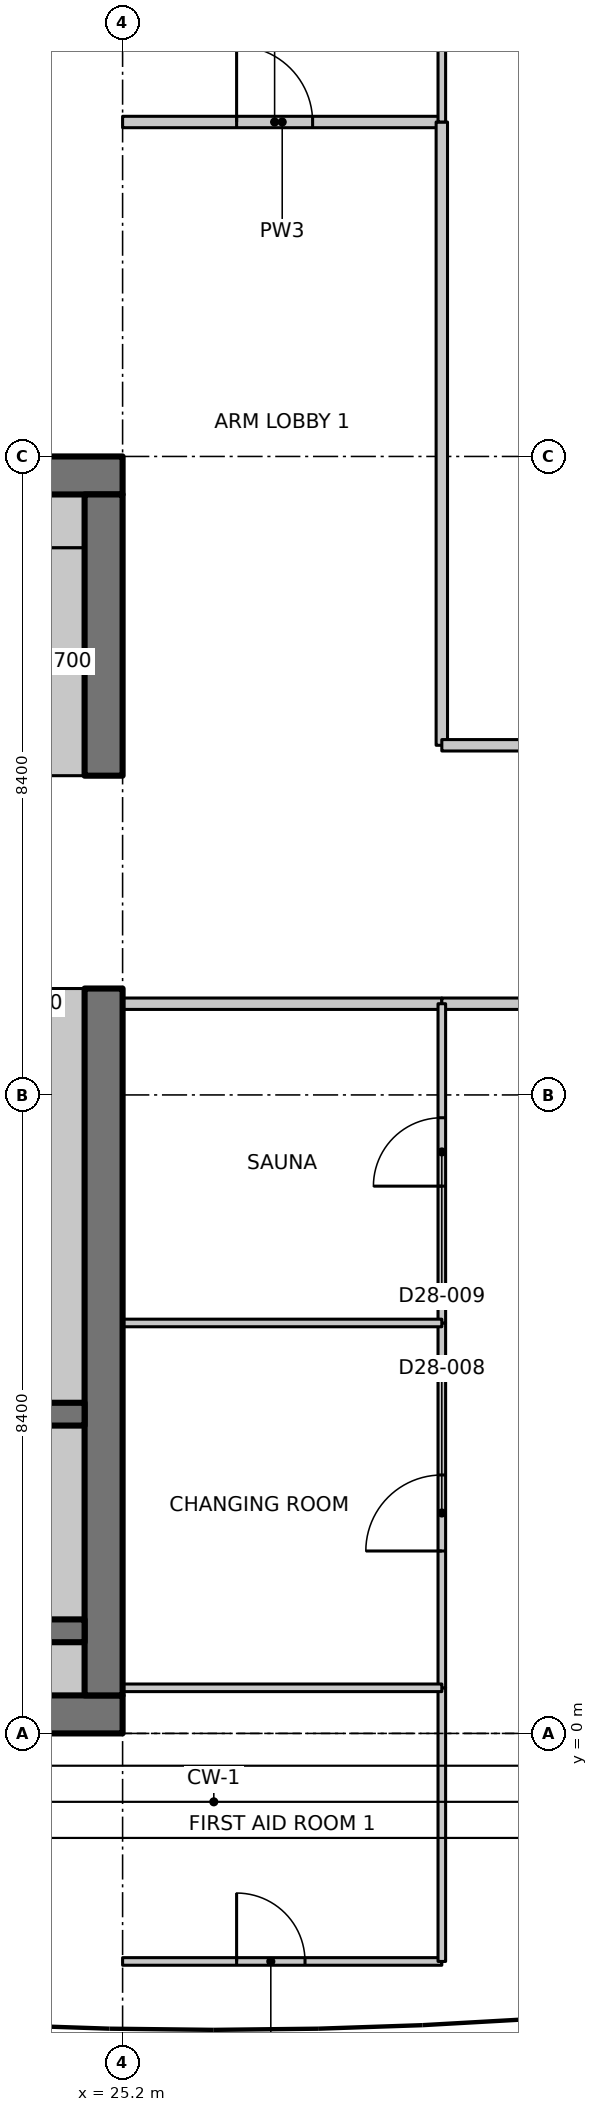
"""IFC4 building model, lengths in metres.
Left out: names, types, materials, properties, quantities, classifications, styles, units other than length and angle.
Written with IfcOpenShell. Run it as: python <this file> out.ifc"""

import sys

from ifc_helpers import new_model, si_unit, direction, frame, frame_2d, origin, place, context, subcontext, project, spatial, polyline, rectangle, outline, extrude, element, fill, save


model = new_model("IFC4")
c1 = context("Model", 3, precision=1e-05, world=origin(), true_north=direction((0.0, 1.0)))
c2 = subcontext(c1, "Body", "Model", "MODEL_VIEW")
j1 = project(units=[si_unit("LENGTHUNIT", "METRE"), si_unit("PLANEANGLEUNIT", "RADIAN")], contexts=[c1])
p1 = place(None, origin())
s1 = spatial("IfcSite", under=j1, at=p1, CompositionType="ELEMENT")
p2 = place(p1, origin())
s2 = spatial("IfcBuilding", under=s1, at=p2, CompositionType="ELEMENT")
p3 = place(p2, frame((0.0, 0.0, 226.5)))
s3 = spatial("IfcBuildingStorey", under=s2, at=p3, CompositionType="ELEMENT", Elevation=226.5)
p4 = place(p3, frame((7.436, 0.25, 0.0), z_axis=(0.0, 0.0, 1.0), x_axis=(1.0, 0.0, 0.0)))
e1 = element("IfcWall", 1, at=p4, inside=s3, PredefinedType="SHEAR", context=c2, shape_type="SweptSolid", body=[
    extrude(rectangle(XDim=17.764, YDim=0.5, at=frame_2d((8.882, 0.0))), origin(), (0.0, 0.0, 1.0), 3.35),
])
p5 = place(p3, frame((23.8, 16.55, 0.0), z_axis=(0.0, 0.0, 1.0), x_axis=(1.0, 0.0, 0.0)))
e2 = element("IfcWall", 2, at=p5, inside=s3, PredefinedType="SHEAR", context=c2, shape_type="SweptSolid", body=[
    extrude(rectangle(XDim=1.4, YDim=0.5, at=frame_2d((0.7, 0.0))), origin(), (0.0, 0.0, 1.0), 3.35),
])
p6 = place(p3, frame((24.95, 0.5, 0.0), z_axis=(0.0, 0.0, 1.0), x_axis=(0.0, 1.0, 0.0)))
e3 = element("IfcWall", 3, at=p6, inside=s3, PredefinedType="SHEAR", context=c2, shape_type="SweptSolid", body=[
    extrude(rectangle(XDim=9.3, YDim=0.5, at=frame_2d((4.65, 0.0))), origin(), (0.0, 0.0, 1.0), 3.35),
])
p7 = place(p3, frame((24.95, 12.6, 0.0), z_axis=(0.0, 0.0, 1.0), x_axis=(0.0, 1.0, 0.0)))
e4 = element("IfcWall", 4, at=p7, inside=s3, PredefinedType="SHEAR", context=c2, shape_type="SweptSolid", body=[
    extrude(rectangle(XDim=3.7, YDim=0.5, at=frame_2d((1.85, 0.0))), origin(), (0.0, 0.0, 1.0), 3.35),
])
p8 = place(p3, frame((24.35, 12.6, 0.0), z_axis=(0.0, 0.0, 1.0), x_axis=(0.0, 1.0, 0.0)))
e5 = element("IfcWall", 5, at=p8, inside=s3, PredefinedType="PARTITIONING", context=c2, shape_type="SweptSolid", body=[
    extrude(rectangle(XDim=3.0, YDim=0.7, at=frame_2d((1.5, 0.0))), origin(), (0.0, 0.0, 1.0), 3.35),
])
p9 = place(p3, frame((23.8, 15.95, 0.0), z_axis=(0.0, 0.0, 1.0), x_axis=(1.0, 0.0, 0.0)))
e6 = element("IfcWall", 6, at=p9, inside=s3, PredefinedType="PARTITIONING", context=c2, shape_type="SweptSolid", body=[
    extrude(rectangle(XDim=0.9, YDim=0.7, at=frame_2d((0.45, 0.0))), origin(), (0.0, 0.0, 1.0), 3.35),
])
p10 = place(p3, frame((15.8, 1.35, 0.0), z_axis=(0.0, 0.0, 1.0), x_axis=(1.0, 0.0, 0.0)))
e7 = element("IfcWall", 7, at=p10, inside=s3, PredefinedType="SHEAR", context=c2, shape_type="SweptSolid", body=[
    extrude(rectangle(XDim=8.9, YDim=0.3, at=frame_2d((4.45, 0.0))), origin(), (0.0, 0.0, 1.0), 3.35),
])
p11 = place(p3, frame((15.8, 4.2, 0.0), z_axis=(0.0, 0.0, 1.0), x_axis=(1.0, 0.0, 0.0)))
e8 = element("IfcWall", 8, at=p11, inside=s3, PredefinedType="SHEAR", context=c2, shape_type="SweptSolid", body=[
    extrude(rectangle(XDim=8.9, YDim=0.3, at=frame_2d((4.45, 0.0))), origin(), (0.0, 0.0, 1.0), 3.35),
])
p12 = place(p11, frame((0.4, 0.0, 0.0)))
e9 = element("IfcOpeningElement", 9, at=p12, cuts=e8, PredefinedType="OPENING", context=c2, shape_type="SweptSolid", body=[
    extrude(rectangle(XDim=1.0, YDim=2.1, at=frame_2d((0.5, 1.05))), frame((0.0, 0.16, 0.0), z_axis=(0.0, -1.0, 0.0), x_axis=(1.0, 0.0, 0.0)), (0.0, 0.0, 1.0), 0.32),
])
p13 = place(p3, frame((13.35, 0.85, 0.0), z_axis=(0.0, 0.0, 1.0), x_axis=(1.0, 0.0, 0.0)))
e10 = element("IfcWall", 10, at=p13, inside=s3, PredefinedType="PARTITIONING", context=c2, shape_type="SweptSolid", body=[
    extrude(rectangle(XDim=11.35, YDim=0.7, at=frame_2d((5.675, 0.0))), origin(), (0.0, 0.0, 1.0), 3.35),
])
p14 = place(p3, frame((24.35, 1.5, 0.0), z_axis=(0.0, 0.0, 1.0), x_axis=(0.0, 1.0, 0.0)))
e11 = element("IfcWall", 11, at=p14, inside=s3, PredefinedType="PARTITIONING", context=c2, shape_type="SweptSolid", body=[
    extrude(rectangle(XDim=2.55, YDim=0.7, at=frame_2d((1.275, 0.0))), origin(), (0.0, 0.0, 1.0), 3.35),
])
p15 = place(p3, frame((24.35, 4.35, 0.0), z_axis=(0.0, 0.0, 1.0), x_axis=(0.0, 1.0, 0.0)))
e12 = element("IfcWall", 12, at=p15, inside=s3, PredefinedType="PARTITIONING", context=c2, shape_type="SweptSolid", body=[
    extrude(rectangle(XDim=5.45, YDim=0.7, at=frame_2d((2.725, 0.0))), origin(), (0.0, 0.0, 1.0), 3.35),
])
p16 = place(p3, frame((25.2, 21.2, 0.0), z_axis=(0.0, 0.0, 1.0), x_axis=(1.0, 0.0, 0.0)))
e13 = element("IfcWall", 13, at=p16, inside=s3, PredefinedType="PARTITIONING", context=c2, shape_type="SweptSolid", body=[
    extrude(rectangle(XDim=4.2, YDim=0.15, at=frame_2d((2.1, 0.0))), origin(), (0.0, 0.0, 1.0), 3.33),
])
p17 = place(p16, frame((1.5, 0.0, 0.0)))
e14 = element("IfcOpeningElement", 14, at=p17, cuts=e13, PredefinedType="OPENING", context=c2, shape_type="SweptSolid", body=[
    extrude(rectangle(XDim=1.0, YDim=2.1, at=frame_2d((0.5, 1.05))), frame((0.0, 0.085, 0.0), z_axis=(0.0, -1.0, 0.0), x_axis=(1.0, 0.0, 0.0)), (0.0, 0.0, 1.0), 0.17),
])
p18 = place(p3, frame((29.4, 9.6, 0.0), z_axis=(0.0, 0.0, 1.0), x_axis=(-1.0, 0.0, 0.0)))
e15 = element("IfcWall", 15, at=p18, inside=s3, PredefinedType="PARTITIONING", context=c2, shape_type="SweptSolid", body=[
    extrude(rectangle(XDim=4.2, YDim=0.15, at=frame_2d((2.1, 0.0))), origin(), (0.0, 0.0, 1.0), 3.33),
])
p19 = place(p3, frame((29.4, 21.2, 0.0), z_axis=(0.0, 0.0, 1.0), x_axis=(0.0, -1.0, 0.0)))
e16 = element("IfcWall", 16, at=p19, inside=s3, PredefinedType="PARTITIONING", context=c2, shape_type="SweptSolid", body=[
    extrude(rectangle(XDim=8.2, YDim=0.15, at=frame_2d((4.1, 0.0))), origin(), (0.0, 0.0, 1.0), 3.33),
])
p20 = place(p3, frame((29.4, 27.511, 0.0), z_axis=(0.0, 0.0, 1.0), x_axis=(0.0, -1.0, 0.0)))
e17 = element("IfcWall", 17, at=p20, inside=s3, PredefinedType="PARTITIONING", context=c2, shape_type="SweptSolid", body=[
    extrude(outline(polyline([(0.0, 0.0), (6.311, 0.0), (6.311, 3.33), (2.761, 3.33), (2.759, 2.98), (1.863, 2.98), (1.861, 3.33), (0.236, 3.33), (0.0, 3.33), (0.0, 0.0)])), frame((0.0, 0.05, 0.0), z_axis=(0.0, -1.0, 0.0), x_axis=(1.0, 0.0, 0.0)), (0.0, 0.0, 1.0), 0.1),
])
p21 = place(p3, frame((37.8, 9.6, 0.0), z_axis=(0.0, 0.0, 1.0), x_axis=(-1.0, 0.0, 0.0)))
e18 = element("IfcWall", 18, at=p21, inside=s3, PredefinedType="PARTITIONING", context=c2, shape_type="SweptSolid", body=[
    extrude(rectangle(XDim=8.4, YDim=0.15, at=frame_2d((4.2, 0.0))), origin(), (0.0, 0.0, 1.0), 3.33),
])
p22 = place(p21, frame((4.8, 0.0, 0.0)))
e19 = element("IfcOpeningElement", 19, at=p22, cuts=e18, PredefinedType="OPENING", context=c2, shape_type="SweptSolid", body=[
    extrude(rectangle(XDim=2.0, YDim=2.4, at=frame_2d((1.0, 1.2))), frame((0.0, 0.085, 0.0), z_axis=(0.0, -1.0, 0.0), x_axis=(1.0, 0.0, 0.0)), (0.0, 0.0, 1.0), 0.17),
])
p23 = place(p3, frame((29.4, 13.0, 0.0), z_axis=(0.0, 0.0, 1.0), x_axis=(1.0, 0.0, 0.0)))
e20 = element("IfcWall", 20, at=p23, inside=s3, PredefinedType="PARTITIONING", context=c2, shape_type="SweptSolid", body=[
    extrude(rectangle(XDim=8.4, YDim=0.15, at=frame_2d((4.2, 0.0))), origin(), (0.0, 0.0, 1.0), 3.33),
])
p24 = place(p23, frame((3.3, 0.0, 0.0)))
e21 = element("IfcOpeningElement", 21, at=p24, cuts=e20, PredefinedType="OPENING", context=c2, shape_type="SweptSolid", body=[
    extrude(rectangle(XDim=1.8, YDim=2.1, at=frame_2d((0.9, 1.05))), frame((0.0, 0.085, 0.0), z_axis=(0.0, -1.0, 0.0), x_axis=(1.0, 0.0, 0.0)), (0.0, 0.0, 1.0), 0.17),
])
p25 = place(p3, frame((25.2, -3.0, 0.0), z_axis=(0.0, 0.0, 1.0), x_axis=(1.0, 0.0, 0.0)))
e22 = element("IfcWall", 22, at=p25, inside=s3, PredefinedType="PARTITIONING", context=c2, shape_type="SweptSolid", body=[
    extrude(rectangle(XDim=4.2, YDim=0.1, at=frame_2d((2.1, 0.0))), origin(), (0.0, 0.0, 1.0), 3.33),
])
p26 = place(p25, frame((1.5, 0.0, 0.0)))
e23 = element("IfcOpeningElement", 23, at=p26, cuts=e22, PredefinedType="OPENING", context=c2, shape_type="SweptSolid", body=[
    extrude(rectangle(XDim=0.9, YDim=2.1, at=frame_2d((0.45, 1.05))), frame((0.0, 0.06, 0.0), z_axis=(0.0, -1.0, 0.0), x_axis=(1.0, 0.0, 0.0)), (0.0, 0.0, 1.0), 0.12),
])
p27 = place(p3, frame((29.4, -3.0, 0.0), z_axis=(0.0, 0.0, 1.0), x_axis=(0.0, 1.0, 0.0)))
e24 = element("IfcWall", 24, at=p27, inside=s3, PredefinedType="PARTITIONING", context=c2, shape_type="SweptSolid", body=[
    extrude(rectangle(XDim=3.6, YDim=0.1, at=frame_2d((1.8, 0.0))), origin(), (0.0, 0.0, 1.0), 2.98),
])
p28 = place(p3, frame((29.4, 0.6, 0.0), z_axis=(0.0, 0.0, 1.0), x_axis=(0.0, 1.0, 0.0)))
e25 = element("IfcWall", 25, at=p28, inside=s3, PredefinedType="PARTITIONING", context=c2, shape_type="SweptSolid", body=[
    extrude(rectangle(XDim=4.8, YDim=0.1, at=frame_2d((2.4, 0.0))), origin(), (0.0, 0.0, 1.0), 3.33),
])
p29 = place(p28, frame((1.8, 0.0, 0.0)))
e26 = element("IfcOpeningElement", 26, at=p29, cuts=e25, PredefinedType="OPENING", context=c2, shape_type="SweptSolid", body=[
    extrude(rectangle(XDim=1.0, YDim=2.1, at=frame_2d((0.5, 1.05))), frame((0.0, 0.06, 0.0), z_axis=(0.0, -1.0, 0.0), x_axis=(1.0, 0.0, 0.0)), (0.0, 0.0, 1.0), 0.12),
])
p30 = place(p3, frame((29.4, 5.4, 0.0), z_axis=(0.0, 0.0, 1.0), x_axis=(0.0, 1.0, 0.0)))
e27 = element("IfcWall", 27, at=p30, inside=s3, PredefinedType="PARTITIONING", context=c2, shape_type="SweptSolid", body=[
    extrude(rectangle(XDim=4.2, YDim=0.1, at=frame_2d((2.1, 0.0))), origin(), (0.0, 0.0, 1.0), 3.33),
])
p31 = place(p30, frame((1.8, 0.0, 0.0)))
e28 = element("IfcOpeningElement", 28, at=p31, cuts=e27, PredefinedType="OPENING", context=c2, shape_type="SweptSolid", body=[
    extrude(rectangle(XDim=0.9, YDim=2.1, at=frame_2d((0.45, 1.05))), frame((0.0, 0.06, 0.0), z_axis=(0.0, -1.0, 0.0), x_axis=(1.0, 0.0, 0.0)), (0.0, 0.0, 1.0), 0.12),
])
for number, where, z_axis, x_axis in (
    (29, (25.2, 0.6, 0.0), (0.0, 0.0, 1.0), (1.0, 0.0, 0.0)),
    (30, (25.2, 5.4, 0.0), (0.0, 0.0, 1.0), (1.0, 0.0, 0.0)),
):
    element("IfcWall", number, at=place(p3, frame(where, z_axis=z_axis, x_axis=x_axis)), inside=s3, PredefinedType="PARTITIONING", context=c2, shape_type="SweptSolid", body=[
        extrude(rectangle(XDim=4.2, YDim=0.1, at=frame_2d((2.1, 0.0))), origin(), (0.0, 0.0, 1.0), 3.33),
    ])
p32 = place(p17, origin())
e31 = element("IfcDoor", 31, at=p32, inside=s3, OperationType="SINGLE_SWING_LEFT", PredefinedType="DOOR", context=c2, shape_type="SweptSolid", body=[
    extrude(rectangle(XDim=1.0, YDim=2.1, at=frame_2d((0.5, 1.05))), frame((0.0, 0.025, 0.0), z_axis=(0.0, -1.0, 0.0), x_axis=(1.0, 0.0, 0.0)), (0.0, 0.0, 1.0), 0.05),
])
fill(e14, e31)
p33 = place(p26, origin())
e32 = element("IfcDoor", 32, at=p33, inside=s3, OperationType="SINGLE_SWING_LEFT", PredefinedType="DOOR", context=c2, shape_type="SweptSolid", body=[
    extrude(rectangle(XDim=0.9, YDim=2.1, at=frame_2d((0.45, 1.05))), frame((0.0, 0.025, 0.0), z_axis=(0.0, -1.0, 0.0), x_axis=(1.0, 0.0, 0.0)), (0.0, 0.0, 1.0), 0.05),
])
fill(e23, e32)
p34 = place(p29, origin())
e33 = element("IfcDoor", 33, at=p34, inside=s3, OperationType="SINGLE_SWING_LEFT", PredefinedType="DOOR", context=c2, shape_type="SweptSolid", body=[
    extrude(rectangle(XDim=1.0, YDim=2.1, at=frame_2d((0.5, 1.05))), frame((0.0, 0.025, 0.0), z_axis=(0.0, -1.0, 0.0), x_axis=(1.0, 0.0, 0.0)), (0.0, 0.0, 1.0), 0.05),
])
fill(e26, e33)
p35 = place(p31, origin())
e34 = element("IfcDoor", 34, at=p35, inside=s3, OperationType="SINGLE_SWING_LEFT", PredefinedType="DOOR", context=c2, shape_type="SweptSolid", body=[
    extrude(rectangle(XDim=0.9, YDim=2.1, at=frame_2d((0.45, 1.05))), frame((0.0, 0.025, 0.0), z_axis=(0.0, -1.0, 0.0), x_axis=(1.0, 0.0, 0.0)), (0.0, 0.0, 1.0), 0.05),
])
fill(e28, e34)
save(model, sys.argv[1])
